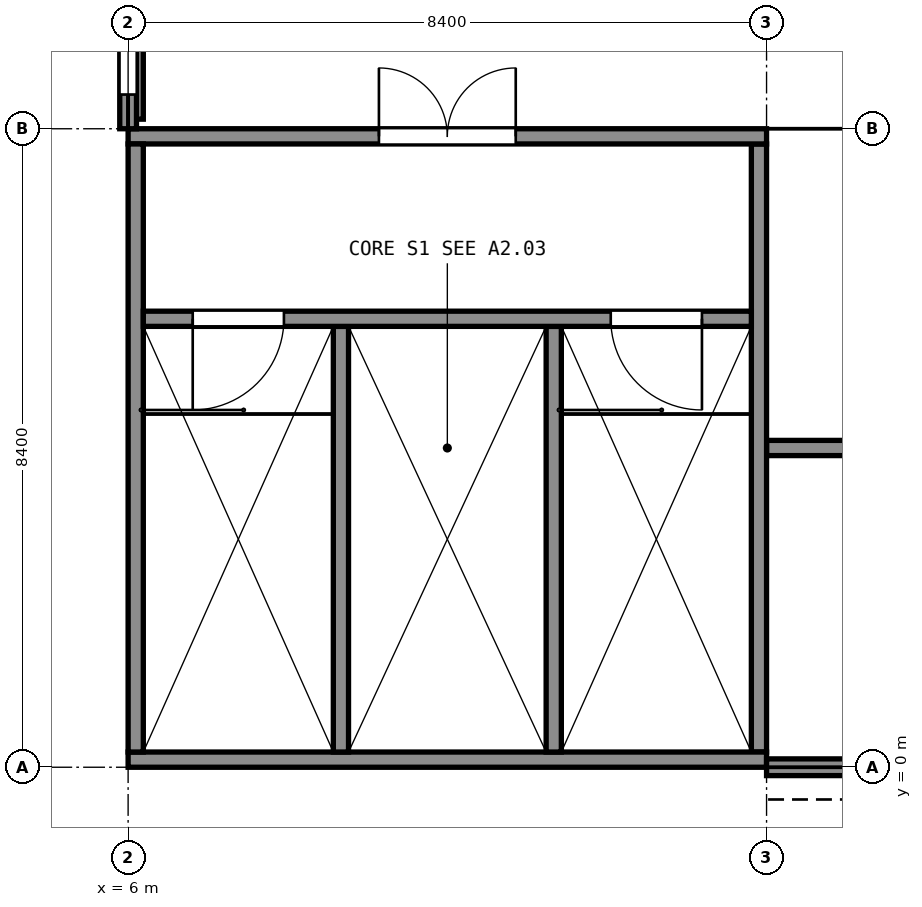
"""IFC4 building model, lengths in metres.
Left out: names, types, materials, properties, quantities, classifications, styles, units other than length and angle.
Written with IfcOpenShell. Run it as: python <this file> out.ifc"""

import sys

from ifc_helpers import new_model, si_unit, direction, frame, frame_2d, origin, place, context, subcontext, project, spatial, polyline, rectangle, outline, extrude, element, fill, save


model = new_model("IFC4")
c1 = context("Model", 3, precision=1e-05, world=origin(), true_north=direction((0.0, 1.0)))
c2 = subcontext(c1, "Body", "Model", "MODEL_VIEW")
j1 = project(units=[si_unit("LENGTHUNIT", "METRE"), si_unit("PLANEANGLEUNIT", "RADIAN")], contexts=[c1])
p1 = place(None, origin())
s1 = spatial("IfcSite", under=j1, at=p1, CompositionType="ELEMENT")
p2 = place(p1, origin())
s2 = spatial("IfcBuilding", under=s1, at=p2, CompositionType="ELEMENT")
p3 = place(p2, frame((0.0, 0.0, 25.0)))
s3 = spatial("IfcBuildingStorey", under=s2, at=p3, CompositionType="ELEMENT", Elevation=25.0)
p4 = place(p3, frame((6.0, 0.1, 0.0), z_axis=(0.0, 0.0, 1.0), x_axis=(1.0, 0.0, 0.0)))
e1 = element("IfcWall", 1, at=p4, inside=s3, PredefinedType="SHEAR", context=c2, shape_type="SweptSolid", body=[
    extrude(rectangle(XDim=8.4, YDim=0.2, at=frame_2d((4.2, 0.0))), origin(), (0.0, 0.0, 1.0), 4.433),
])
p5 = place(p3, frame((6.0, 8.3, 0.0), z_axis=(0.0, 0.0, 1.0), x_axis=(1.0, 0.0, 0.0)))
e2 = element("IfcWall", 2, at=p5, inside=s3, PredefinedType="SHEAR", context=c2, shape_type="SweptSolid", body=[
    extrude(rectangle(XDim=8.4, YDim=0.2, at=frame_2d((4.2, 0.0))), origin(), (0.0, 0.0, 1.0), 7.097),
])
p6 = place(p5, frame((3.3, 0.0, 0.0)))
e3 = element("IfcOpeningElement", 3, at=p6, cuts=e2, PredefinedType="OPENING", context=c2, shape_type="SweptSolid", body=[
    extrude(rectangle(XDim=1.8, YDim=2.1, at=frame_2d((0.9, 1.05))), frame((0.0, 0.11, 0.0), z_axis=(0.0, -1.0, 0.0), x_axis=(1.0, 0.0, 0.0)), (0.0, 0.0, 1.0), 0.22),
])
for number, where, z_axis, x_axis in (
    (4, (6.1, 0.2, 0.0), (0.0, 0.0, 1.0), (0.0, 1.0, 0.0)),
    (5, (14.3, 0.2, 0.0), (0.0, 0.0, 1.0), (0.0, 1.0, 0.0)),
):
    element("IfcWall", number, at=place(p3, frame(where, z_axis=z_axis, x_axis=x_axis)), inside=s3, PredefinedType="SHEAR", context=c2, shape_type="SweptSolid", body=[
        extrude(outline(polyline([(0.0, 0.0), (8.0, 0.0), (8.0, 7.064), (7.111, 6.776), (6.815, 6.679), (6.222, 6.487), (5.926, 6.39), (5.037, 6.102), (4.741, 6.005), (3.852, 5.717), (3.556, 5.62), (2.963, 5.428), (2.667, 5.331), (1.778, 5.043), (1.481, 4.946), (0.593, 4.658), (0.296, 4.561), (0.0, 4.465), (0.0, 0.0)])), frame((0.0, 0.1, 0.0), z_axis=(0.0, -1.0, 0.0), x_axis=(1.0, 0.0, 0.0)), (0.0, 0.0, 1.0), 0.2),
    ])
p7 = place(p3, frame((6.2, 5.9, 0.0), z_axis=(0.0, 0.0, 1.0), x_axis=(1.0, 0.0, 0.0)))
e6 = element("IfcWall", 6, at=p7, inside=s3, PredefinedType="SHEAR", context=c2, shape_type="SweptSolid", body=[
    extrude(rectangle(XDim=8.0, YDim=0.2, at=frame_2d((4.0, 0.0))), origin(), (0.0, 0.0, 1.0), 6.317),
])
p8 = place(p7, frame((0.65, 0.0, 0.0)))
e7 = element("IfcOpeningElement", 7, at=p8, cuts=e6, PredefinedType="OPENING", context=c2, shape_type="SweptSolid", body=[
    extrude(rectangle(XDim=1.2, YDim=2.1, at=frame_2d((0.6, 1.05))), frame((0.0, 0.11, 0.0), z_axis=(0.0, -1.0, 0.0), x_axis=(1.0, 0.0, 0.0)), (0.0, 0.0, 1.0), 0.22),
])
p9 = place(p7, frame((6.15, 0.0, 0.0)))
e8 = element("IfcOpeningElement", 8, at=p9, cuts=e6, PredefinedType="OPENING", context=c2, shape_type="SweptSolid", body=[
    extrude(rectangle(XDim=1.2, YDim=2.1, at=frame_2d((0.6, 1.05))), frame((0.0, 0.11, 0.0), z_axis=(0.0, -1.0, 0.0), x_axis=(1.0, 0.0, 0.0)), (0.0, 0.0, 1.0), 0.22),
])
for number, where, z_axis, x_axis in (
    (9, (8.8, 0.2, 0.0), (0.0, 0.0, 1.0), (0.0, 1.0, 0.0)),
    (10, (11.6, 0.2, 0.0), (0.0, 0.0, 1.0), (0.0, 1.0, 0.0)),
):
    element("IfcWall", number, at=place(p3, frame(where, z_axis=z_axis, x_axis=x_axis)), inside=s3, PredefinedType="SHEAR", context=c2, shape_type="SweptSolid", body=[
        extrude(outline(polyline([(0.0, 0.0), (5.6, 0.0), (5.6, 6.285), (4.421, 5.901), (4.126, 5.806), (3.242, 5.518), (2.948, 5.423), (2.063, 5.135), (1.768, 5.04), (0.884, 4.752), (0.59, 4.657), (0.0, 4.465), (0.0, 0.0)])), frame((0.0, 0.1, 0.0), z_axis=(0.0, -1.0, 0.0), x_axis=(1.0, 0.0, 0.0)), (0.0, 0.0, 1.0), 0.2),
    ])
p10 = place(p3, frame((14.4, 0.0, 0.0), z_axis=(0.0, 0.0, 1.0), x_axis=(1.0, 0.0, 0.0)))
e11 = element("IfcWall", 11, at=p10, inside=s3, PredefinedType="SOLIDWALL", context=c2, shape_type="SweptSolid", body=[
    extrude(rectangle(XDim=8.1, YDim=0.22, at=frame_2d((4.05, 0.0))), origin(), (0.0, 0.0, 1.0), 4.334),
])
p11 = place(p3, frame((6.0, 8.4, 0.0), z_axis=(0.0, 0.0, 1.0), x_axis=(0.0, 1.0, 0.0)))
e12 = element("IfcWall", 12, at=p11, inside=s3, PredefinedType="SOLIDWALL", context=c2, shape_type="SweptSolid", body=[
    extrude(outline(polyline([(0.0, 0.0), (8.1, 0.0), (8.1, 4.432), (0.0, 7.096), (0.0, 0.0)])), frame((0.0, 0.11, 0.0), z_axis=(0.0, -1.0, 0.0), x_axis=(1.0, 0.0, 0.0)), (0.0, 0.0, 1.0), 0.22),
])
p12 = place(p11, frame((0.45, 0.0, 0.9)))
e13 = element("IfcOpeningElement", 13, at=p12, cuts=e12, PredefinedType="OPENING", context=c2, shape_type="SweptSolid", body=[
    extrude(rectangle(XDim=3.6, YDim=1.5, at=frame_2d((1.8, 0.75))), frame((0.0, 0.12, 0.0), z_axis=(0.0, -1.0, 0.0), x_axis=(1.0, 0.0, 0.0)), (0.0, 0.0, 1.0), 0.24),
])
p13 = place(p3, frame((6.1, 8.526, 3.631), z_axis=(0.0, 0.0, 1.0), x_axis=(0.0, 1.0, 0.0)))
e14 = element("IfcWall", 14, at=p13, inside=s3, PredefinedType="PARAPET", context=c2, shape_type="SweptSolid", body=[
    extrude(outline(polyline([(0.0, 4.052), (12.474, 0.0), (12.474, 0.605), (0.0, 4.656), (0.0, 4.052)])), frame((0.0, 0.1, 0.0), z_axis=(0.0, -1.0, 0.0), x_axis=(1.0, 0.0, 0.0)), (0.0, 0.0, 1.0), 0.2),
])
p14 = place(p3, frame((14.4, 4.2, 0.0), z_axis=(0.0, 0.0, 1.0), x_axis=(1.0, 0.0, 0.0)))
e15 = element("IfcWall", 15, at=p14, inside=s3, PredefinedType="PARTITIONING", context=c2, shape_type="SweptSolid", body=[
    extrude(outline(polyline([(0.0, 0.0), (8.4, 0.0), (8.4, 5.265), (5.25, 5.265), (4.2, 4.342), (3.15, 5.265), (0.0, 5.265), (0.0, 0.0)])), frame((0.0, 0.1, 0.0), z_axis=(0.0, -1.0, 0.0), x_axis=(1.0, 0.0, 0.0)), (0.0, 0.0, 1.0), 0.2),
])
p15 = place(p12, origin())
e16 = element("IfcWindow", 16, at=p15, inside=s3, PartitioningType="DOUBLE_PANEL_VERTICAL", PredefinedType="WINDOW", context=c2, shape_type="SweptSolid", body=[
    extrude(rectangle(XDim=3.6, YDim=1.5, at=frame_2d((1.8, 0.75))), frame((0.0, -0.03, 0.0), z_axis=(0.0, -1.0, 0.0), x_axis=(1.0, 0.0, 0.0)), (0.0, 0.0, 1.0), 0.06),
])
fill(e13, e16)
p16 = place(p6, origin())
e17 = element("IfcDoor", 17, at=p16, inside=s3, OperationType="DOUBLE_DOOR_SINGLE_SWING", PredefinedType="DOOR", context=c2, shape_type="SweptSolid", body=[
    extrude(rectangle(XDim=1.8, YDim=2.1, at=frame_2d((0.9, 1.05))), frame((0.0, 0.025, 0.0), z_axis=(0.0, -1.0, 0.0), x_axis=(1.0, 0.0, 0.0)), (0.0, 0.0, 1.0), 0.05),
])
fill(e3, e17)
p17 = place(p8, origin())
e18 = element("IfcDoor", 18, at=p17, inside=s3, OperationType="SINGLE_SWING_LEFT", PredefinedType="DOOR", context=c2, shape_type="SweptSolid", body=[
    extrude(rectangle(XDim=1.2, YDim=2.1, at=frame_2d((0.6, 1.05))), frame((0.0, 0.025, 0.0), z_axis=(0.0, -1.0, 0.0), x_axis=(1.0, 0.0, 0.0)), (0.0, 0.0, 1.0), 0.05),
])
fill(e7, e18)
p18 = place(p9, origin())
e19 = element("IfcDoor", 19, at=p18, inside=s3, OperationType="SINGLE_SWING_RIGHT", PredefinedType="DOOR", context=c2, shape_type="SweptSolid", body=[
    extrude(rectangle(XDim=1.2, YDim=2.1, at=frame_2d((0.6, 1.05))), frame((0.0, 0.025, 0.0), z_axis=(0.0, -1.0, 0.0), x_axis=(1.0, 0.0, 0.0)), (0.0, 0.0, 1.0), 0.05),
])
fill(e8, e19)
save(model, sys.argv[1])
